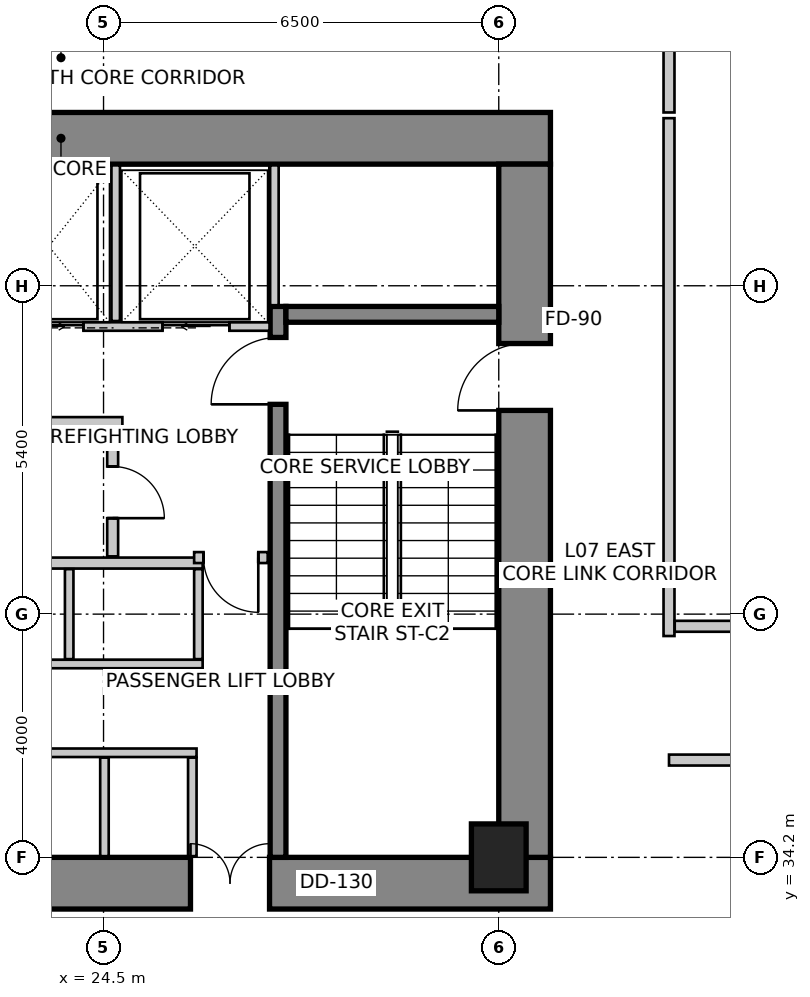
"""IFC4 building model, lengths in metres.
Left out: names, types, materials, properties, quantities, classifications, styles, units other than length and angle.
Written with IfcOpenShell. Run it as: python <this file> out.ifc"""

import sys

from ifc_helpers import new_model, si_unit, direction, frame, frame_2d, origin, origin_2d, place, context, subcontext, project, spatial, rectangle, extrude, source, transform, mapped, element, fill, save


model = new_model("IFC4")
c1 = context("Model", 3, precision=1e-05, world=origin(), true_north=direction((0.0, 1.0)))
c2 = subcontext(c1, "Body", "Model", "MODEL_VIEW")
j1 = project(units=[si_unit("LENGTHUNIT", "METRE"), si_unit("PLANEANGLEUNIT", "RADIAN")], contexts=[c1])
p1 = place(None, origin())
s1 = spatial("IfcSite", under=j1, at=p1, CompositionType="ELEMENT")
p2 = place(p1, origin())
s2 = spatial("IfcBuilding", under=s1, at=p2, CompositionType="ELEMENT")
p3 = place(p2, frame((0.0, 0.0, 31.0)))
s3 = spatial("IfcBuildingStorey", under=s2, at=p3, CompositionType="ELEMENT", Elevation=31.0)
p4 = place(p3, frame((15.75, 46.025, 0.0), z_axis=(0.0, 0.0, 1.0), x_axis=(1.0, 0.0, 0.0)))
e1 = element("IfcWall", 1, at=p4, inside=s3, PredefinedType="SHEAR", context=c2, shape_type="SweptSolid", body=[
    extrude(rectangle(XDim=16.1, YDim=0.85, at=frame_2d((8.05, 0.0))), origin(), (0.0, 0.0, 1.0), 4.0),
])
p5 = place(p3, frame((15.75, 33.775, 0.0), z_axis=(0.0, 0.0, 1.0), x_axis=(1.0, 0.0, 0.0)))
e2 = element("IfcWall", 2, at=p5, inside=s3, PredefinedType="SHEAR", context=c2, shape_type="SweptSolid", body=[
    extrude(rectangle(XDim=16.1, YDim=0.85, at=frame_2d((8.05, 0.0))), origin(), (0.0, 0.0, 1.0), 4.0),
])
m1 = source(origin(), c2, "Body", "SweptSolid", [
    extrude(rectangle(XDim=1.3, YDim=2.15, at=frame_2d((0.65, 1.075))), frame((0.0, 0.435, 0.0), z_axis=(0.0, -1.0, 0.0), x_axis=(1.0, 0.0, 0.0)), (0.0, 0.0, 1.0), 0.87),
])
p6 = place(p5, frame((10.18, 0.0, 0.0)))
e3 = element("IfcOpeningElement", 3, at=p6, cuts=e2, PredefinedType="OPENING", context=c2, shape_type="MappedRepresentation", body=[
    mapped(m1, transform((0.0, 0.0, 0.0), scale=1.0)),
])
p7 = place(p3, frame((31.425, 34.2, 0.0), z_axis=(0.0, 0.0, 1.0), x_axis=(0.0, 1.0, 0.0)))
e4 = element("IfcWall", 4, at=p7, inside=s3, PredefinedType="SHEAR", context=c2, shape_type="SweptSolid", body=[
    extrude(rectangle(XDim=11.4, YDim=0.85, at=frame_2d((5.7, 0.0))), origin(), (0.0, 0.0, 1.0), 4.0),
])
m2 = source(origin(), c2, "Body", "SweptSolid", [
    extrude(rectangle(XDim=1.1, YDim=2.15, at=frame_2d((0.55, 1.075))), frame((0.0, 0.435, 0.0), z_axis=(0.0, -1.0, 0.0), x_axis=(1.0, 0.0, 0.0)), (0.0, 0.0, 1.0), 0.87),
])
p8 = place(p7, frame((7.35, 0.0, 0.0)))
e5 = element("IfcOpeningElement", 5, at=p8, cuts=e4, PredefinedType="OPENING", context=c2, shape_type="MappedRepresentation", body=[
    mapped(m2, transform((0.0, 0.0, 0.0), scale=1.0)),
])
p9 = place(p3, frame((27.37, 34.2, 0.0), z_axis=(0.0, 0.0, 1.0), x_axis=(0.0, 1.0, 0.0)))
e6 = element("IfcWall", 6, at=p9, inside=s3, PredefinedType="SHEAR", context=c2, shape_type="SweptSolid", body=[
    extrude(rectangle(XDim=9.06, YDim=0.26, at=frame_2d((4.53, 0.0))), origin(), (0.0, 0.0, 1.0), 4.0),
])
m3 = source(origin(), c2, "Body", "SweptSolid", [
    extrude(rectangle(XDim=1.1, YDim=2.15, at=frame_2d((0.55, 1.075))), frame((0.0, 0.14, 0.0), z_axis=(0.0, -1.0, 0.0), x_axis=(1.0, 0.0, 0.0)), (0.0, 0.0, 1.0), 0.28),
])
p10 = place(p9, frame((7.45, 0.0, 0.0)))
e7 = element("IfcOpeningElement", 7, at=p10, cuts=e6, PredefinedType="OPENING", context=c2, shape_type="MappedRepresentation", body=[
    mapped(m3, transform((0.0, 0.0, 0.0), scale=1.0)),
])
p11 = place(p3, frame((27.5, 43.13, 0.0), z_axis=(0.0, 0.0, 1.0), x_axis=(1.0, 0.0, 0.0)))
e8 = element("IfcWall", 8, at=p11, inside=s3, PredefinedType="SHEAR", context=c2, shape_type="SweptSolid", body=[
    extrude(rectangle(XDim=3.5, YDim=0.26, at=frame_2d((1.75, 0.0))), origin(), (0.0, 0.0, 1.0), 4.0),
])
m4 = source(origin(), c2, "Body", "SweptSolid", [
    extrude(rectangle(XDim=0.9, YDim=1.1, at=origin_2d()), origin(), (0.0, 0.0, 1.0), 4.0),
])
p12 = place(p3, frame((31.0, 34.2, 0.0), z_axis=(0.0, 0.0, 1.0), x_axis=(1.0, 0.0, 0.0)))
e9 = element("IfcColumn", 9, at=p12, inside=s3, PredefinedType="COLUMN", context=c2, shape_type="MappedRepresentation", body=[
    mapped(m4, transform((0.0, 0.0, 0.0), scale=1.0)),
])
p13 = place(p3, frame((58.761, 46.648, 0.0), z_axis=(0.0, 0.0, 1.0), x_axis=(-0.98607502735, 0.166301053624, 0.0)))
e10 = element("IfcWall", 10, at=p13, inside=s3, PredefinedType="SOLIDWALL", context=c2, shape_type="SweptSolid", body=[
    extrude(rectangle(XDim=37.397, YDim=0.3, at=frame_2d((18.699, 0.0))), origin(), (0.0, 0.0, 1.0), 3.75),
])
m5 = source(origin(), c2, "Body", "SweptSolid", [
    extrude(rectangle(XDim=2.1, YDim=2.0, at=frame_2d((1.05, 1.0))), frame((0.0, 0.16, 0.0), z_axis=(0.0, -1.0, 0.0), x_axis=(1.0, 0.0, 0.0)), (0.0, 0.0, 1.0), 0.32),
])
p14 = place(p13, frame((0.525, 0.0, 0.85)))
e11 = element("IfcOpeningElement", 11, at=p14, cuts=e10, PredefinedType="OPENING", context=c2, shape_type="MappedRepresentation", body=[
    mapped(m5, transform((0.0, 0.0, 0.0), scale=1.0)),
])
m6 = source(origin(), c2, "Body", "SweptSolid", [
    extrude(rectangle(XDim=2.4, YDim=2.2, at=frame_2d((1.2, 1.1))), frame((0.0, 0.16, 0.0), z_axis=(0.0, -1.0, 0.0), x_axis=(1.0, 0.0, 0.0)), (0.0, 0.0, 1.0), 0.32),
])
p15 = place(p13, frame((4.74, 0.0, 0.85)))
e12 = element("IfcOpeningElement", 12, at=p15, cuts=e10, PredefinedType="OPENING", context=c2, shape_type="MappedRepresentation", body=[
    mapped(m6, transform((0.0, 0.0, 0.0), scale=1.0)),
])
m7 = source(origin(), c2, "Body", "SweptSolid", [
    extrude(rectangle(XDim=2.8, YDim=2.4, at=frame_2d((1.4, 1.2))), frame((0.0, 0.16, 0.0), z_axis=(0.0, -1.0, 0.0), x_axis=(1.0, 0.0, 0.0)), (0.0, 0.0, 1.0), 0.32),
])
p16 = place(p13, frame((9.881, 0.0, 0.85)))
e13 = element("IfcOpeningElement", 13, at=p16, cuts=e10, PredefinedType="OPENING", context=c2, shape_type="MappedRepresentation", body=[
    mapped(m7, transform((0.0, 0.0, 0.0), scale=1.0)),
])
p17 = place(p13, frame((15.473, 0.0, 0.85)))
e14 = element("IfcOpeningElement", 14, at=p17, cuts=e10, PredefinedType="OPENING", context=c2, shape_type="MappedRepresentation", body=[
    mapped(m6, transform((0.0, 0.0, 0.0), scale=1.0)),
])
p18 = place(p13, frame((19.836, 0.0, 0.85)))
e15 = element("IfcOpeningElement", 15, at=p18, cuts=e10, PredefinedType="OPENING", context=c2, shape_type="MappedRepresentation", body=[
    mapped(m7, transform((0.0, 0.0, 0.0), scale=1.0)),
])
p19 = place(p13, frame((24.598, 0.0, 0.85)))
e16 = element("IfcOpeningElement", 16, at=p19, cuts=e10, PredefinedType="OPENING", context=c2, shape_type="MappedRepresentation", body=[
    mapped(m6, transform((0.0, 0.0, 0.0), scale=1.0)),
])
p20 = place(p13, frame((29.957, 0.0, 0.85)))
e17 = element("IfcOpeningElement", 17, at=p20, cuts=e10, PredefinedType="OPENING", context=c2, shape_type="MappedRepresentation", body=[
    mapped(m6, transform((0.0, 0.0, 0.0), scale=1.0)),
])
p21 = place(p13, frame((34.456, 0.0, 0.85)))
e18 = element("IfcOpeningElement", 18, at=p21, cuts=e10, PredefinedType="OPENING", context=c2, shape_type="MappedRepresentation", body=[
    mapped(m6, transform((0.0, 0.0, 0.0), scale=1.0)),
])
p22 = place(p3, frame((20.37, 42.93, 0.0), z_axis=(0.0, 0.0, 1.0), x_axis=(1.0, 0.0, 0.0)))
e19 = element("IfcWall", 19, at=p22, inside=s3, PredefinedType="SOLIDWALL", context=c2, shape_type="SweptSolid", body=[
    extrude(rectangle(XDim=6.86, YDim=0.14, at=frame_2d((3.43, 0.0))), origin(), (0.0, 0.0, 1.0), 3.75),
])
m8 = source(origin(), c2, "Body", "SweptSolid", [
    extrude(rectangle(XDim=1.1, YDim=2.15, at=frame_2d((0.55, 1.075))), frame((0.0, 0.08, 0.0), z_axis=(0.0, -1.0, 0.0), x_axis=(1.0, 0.0, 0.0)), (0.0, 0.0, 1.0), 0.16),
])
p23 = place(p22, frame((0.5, 0.0, 0.0)))
e20 = element("IfcOpeningElement", 20, at=p23, cuts=e19, PredefinedType="OPENING", context=c2, shape_type="MappedRepresentation", body=[
    mapped(m8, transform((0.0, 0.0, 0.0), scale=1.0)),
])
p24 = place(p22, frame((2.7, 0.0, 0.0)))
e21 = element("IfcOpeningElement", 21, at=p24, cuts=e19, PredefinedType="OPENING", context=c2, shape_type="MappedRepresentation", body=[
    mapped(m8, transform((0.0, 0.0, 0.0), scale=1.0)),
])
p25 = place(p22, frame((5.1, 0.0, 0.0)))
e22 = element("IfcOpeningElement", 22, at=p25, cuts=e19, PredefinedType="OPENING", context=c2, shape_type="MappedRepresentation", body=[
    mapped(m8, transform((0.0, 0.0, 0.0), scale=1.0)),
])
p26 = place(p3, frame((27.31, 43.28, 0.0), z_axis=(0.0, 0.0, 1.0), x_axis=(0.0, 1.0, 0.0)))
e23 = element("IfcWall", 23, at=p26, inside=s3, PredefinedType="SOLIDWALL", context=c2, shape_type="SweptSolid", body=[
    extrude(rectangle(XDim=2.3, YDim=0.14, at=frame_2d((1.15, 0.0))), origin(), (0.0, 0.0, 1.0), 3.75),
])
p27 = place(p3, frame((24.7, 43.02, 0.0), z_axis=(0.0, 0.0, 1.0), x_axis=(0.0, 1.0, 0.0)))
e24 = element("IfcWall", 24, at=p27, inside=s3, PredefinedType="SOLIDWALL", context=c2, shape_type="SweptSolid", body=[
    extrude(rectangle(XDim=2.56, YDim=0.14, at=frame_2d((1.28, 0.0))), origin(), (0.0, 0.0, 1.0), 3.75),
])
p28 = place(p3, frame((20.38, 35.92, 0.0), z_axis=(0.0, 0.0, 1.0), x_axis=(1.0, 0.0, 0.0)))
e25 = element("IfcWall", 25, at=p28, inside=s3, PredefinedType="SOLIDWALL", context=c2, shape_type="SweptSolid", body=[
    extrude(rectangle(XDim=5.65, YDim=0.14, at=frame_2d((2.825, 0.0))), origin(), (0.0, 0.0, 1.0), 3.75),
])
m9 = source(origin(), c2, "Body", "SweptSolid", [
    extrude(rectangle(XDim=1.0, YDim=2.15, at=frame_2d((0.5, 1.075))), frame((0.0, 0.08, 0.0), z_axis=(0.0, -1.0, 0.0), x_axis=(1.0, 0.0, 0.0)), (0.0, 0.0, 1.0), 0.16),
])
p29 = place(p28, frame((0.16, 0.0, 0.0)))
e26 = element("IfcOpeningElement", 26, at=p29, cuts=e25, PredefinedType="OPENING", context=c2, shape_type="MappedRepresentation", body=[
    mapped(m9, transform((0.0, 0.0, 0.0), scale=1.0)),
])
p30 = place(p28, frame((1.55, 0.0, 0.0)))
e27 = element("IfcOpeningElement", 27, at=p30, cuts=e25, PredefinedType="OPENING", context=c2, shape_type="MappedRepresentation", body=[
    mapped(m9, transform((0.0, 0.0, 0.0), scale=1.0)),
])
for number, where, z_axis, x_axis in (
    (28, (25.96, 34.22, 0.0), (0.0, 0.0, 1.0), (0.0, 1.0, 0.0)),
    (29, (24.515, 34.22, 0.0), (0.0, 0.0, 1.0), (0.0, 1.0, 0.0)),
):
    element("IfcWall", number, at=place(p3, frame(where, z_axis=z_axis, x_axis=x_axis)), inside=s3, PredefinedType="SOLIDWALL", context=c2, shape_type="SweptSolid", body=[
        extrude(rectangle(XDim=1.62, YDim=0.14, at=frame_2d((0.81, 0.0))), origin(), (0.0, 0.0, 1.0), 3.042),
    ])
p31 = place(p3, frame((20.38, 37.38, 0.0), z_axis=(0.0, 0.0, 1.0), x_axis=(1.0, 0.0, 0.0)))
e30 = element("IfcWall", 30, at=p31, inside=s3, PredefinedType="SOLIDWALL", context=c2, shape_type="SweptSolid", body=[
    extrude(rectangle(XDim=5.75, YDim=0.14, at=frame_2d((2.875, 0.0))), origin(), (0.0, 0.0, 1.0), 3.75),
])
p32 = place(p3, frame((20.38, 39.04, 0.0), z_axis=(0.0, 0.0, 1.0), x_axis=(1.0, 0.0, 0.0)))
e31 = element("IfcWall", 31, at=p32, inside=s3, PredefinedType="SOLIDWALL", context=c2, shape_type="SweptSolid", body=[
    extrude(rectangle(XDim=5.75, YDim=0.18, at=frame_2d((2.875, 0.0))), origin(), (0.0, 0.0, 1.0), 3.75),
])
for number, where, z_axis, x_axis in (
    (32, (26.06, 37.46, 0.0), (0.0, 0.0, 1.0), (0.0, 1.0, 0.0)),
    (33, (23.935, 37.46, 0.0), (0.0, 0.0, 1.0), (0.0, 1.0, 0.0)),
):
    element("IfcWall", number, at=place(p3, frame(where, z_axis=z_axis, x_axis=x_axis)), inside=s3, PredefinedType="SOLIDWALL", context=c2, shape_type="SweptSolid", body=[
        extrude(rectangle(XDim=1.48, YDim=0.14, at=frame_2d((0.74, 0.0))), origin(), (0.0, 0.0, 1.0), 3.75),
    ])
p33 = place(p3, frame((24.81, 41.35, 0.0), z_axis=(0.0, 0.0, 1.0), x_axis=(-1.0, 0.0, 0.0)))
e34 = element("IfcWall", 34, at=p33, inside=s3, PredefinedType="PARTITIONING", context=c2, shape_type="SweptSolid", body=[
    extrude(rectangle(XDim=4.43, YDim=0.18, at=frame_2d((2.215, 0.0))), origin(), (0.0, 0.0, 1.0), 3.75),
])
p34 = place(p3, frame((24.65, 41.256, 0.0), z_axis=(0.0, 0.0, 1.0), x_axis=(0.0, -1.0, 0.0)))
e35 = element("IfcWall", 35, at=p34, inside=s3, PredefinedType="PARTITIONING", context=c2, shape_type="SweptSolid", body=[
    extrude(rectangle(XDim=2.106, YDim=0.18, at=frame_2d((1.053, 0.0))), origin(), (0.0, 0.0, 1.0), 3.75),
])
m10 = source(origin(), c2, "Body", "SweptSolid", [
    extrude(rectangle(XDim=0.85, YDim=2.15, at=frame_2d((0.425, 1.075))), frame((0.0, 0.1, 0.0), z_axis=(0.0, -1.0, 0.0), x_axis=(1.0, 0.0, 0.0)), (0.0, 0.0, 1.0), 0.2),
])
p35 = place(p34, frame((0.628, 0.0, 0.0)))
e36 = element("IfcOpeningElement", 36, at=p35, cuts=e35, PredefinedType="OPENING", context=c2, shape_type="MappedRepresentation", body=[
    mapped(m10, transform((0.0, 0.0, 0.0), scale=1.0)),
])
p36 = place(p3, frame((27.2, 39.13, 0.0), z_axis=(0.0, 0.0, 1.0), x_axis=(-1.0, 0.0, 0.0)))
e37 = element("IfcWall", 37, at=p36, inside=s3, PredefinedType="PARTITIONING", context=c2, shape_type="SweptSolid", body=[
    extrude(rectangle(XDim=1.21, YDim=0.18, at=frame_2d((0.605, 0.0))), origin(), (0.0, 0.0, 1.0), 3.75),
])
m11 = source(origin(), c2, "Body", "SweptSolid", [
    extrude(rectangle(XDim=0.9, YDim=2.15, at=frame_2d((0.45, 1.075))), frame((0.0, 0.1, 0.0), z_axis=(0.0, -1.0, 0.0), x_axis=(1.0, 0.0, 0.0)), (0.0, 0.0, 1.0), 0.2),
])
p37 = place(p36, frame((0.155, 0.0, 0.0)))
e38 = element("IfcOpeningElement", 38, at=p37, cuts=e37, PredefinedType="OPENING", context=c2, shape_type="MappedRepresentation", body=[
    mapped(m11, transform((0.0, 0.0, 0.0), scale=1.0)),
])
p38 = place(p3, frame((33.8, 48.6, 0.0), z_axis=(0.0, 0.0, 1.0), x_axis=(0.0, -1.0, 0.0)))
e39 = element("IfcWall", 39, at=p38, inside=s3, PredefinedType="PARTITIONING", context=c2, shape_type="SweptSolid", body=[
    extrude(rectangle(XDim=2.15, YDim=0.18, at=frame_2d((1.075, 0.0))), origin(), (0.0, 0.0, 1.0), 2.892),
])
p39 = place(p3, frame((33.8, 46.356, 0.0), z_axis=(0.0, 0.0, 1.0), x_axis=(0.0, -1.0, 0.0)))
e40 = element("IfcWall", 40, at=p39, inside=s3, PredefinedType="PARTITIONING", context=c2, shape_type="SweptSolid", body=[
    extrude(rectangle(XDim=8.516, YDim=0.18, at=frame_2d((4.258, 0.0))), origin(), (0.0, 0.0, 1.0), 3.279),
])
p40 = place(p3, frame((33.894, 38.0, 0.0), z_axis=(0.0, 0.0, 1.0), x_axis=(1.0, 0.0, 0.0)))
e41 = element("IfcWall", 41, at=p40, inside=s3, PredefinedType="PARTITIONING", context=c2, shape_type="SweptSolid", body=[
    extrude(rectangle(XDim=11.033, YDim=0.18, at=frame_2d((5.517, 0.0))), origin(), (0.0, 0.0, 1.0), 3.125),
])
p41 = place(p40, frame((5.006, 0.0, 0.0)))
e42 = element("IfcOpeningElement", 42, at=p41, cuts=e41, PredefinedType="OPENING", context=c2, shape_type="MappedRepresentation", body=[
    mapped(m11, transform((0.0, 0.0, 0.0), scale=1.0)),
])
p42 = place(p3, frame((55.641, 35.8, 0.0), z_axis=(0.0, 0.0, 1.0), x_axis=(-1.0, 0.0, 0.0)))
e43 = element("IfcWall", 43, at=p42, inside=s3, PredefinedType="PARTITIONING", context=c2, shape_type="SweptSolid", body=[
    extrude(rectangle(XDim=21.841, YDim=0.18, at=frame_2d((10.92, 0.0))), origin(), (0.0, 0.0, 1.0), 3.125),
])
p43 = place(p42, frame((10.531, 0.0, 0.0)))
e44 = element("IfcOpeningElement", 44, at=p43, cuts=e43, PredefinedType="OPENING", context=c2, shape_type="MappedRepresentation", body=[
    mapped(m11, transform((0.0, 0.0, 0.0), scale=1.0)),
])
m12 = source(origin(), c2, "Body", "SweptSolid", [
    extrude(rectangle(XDim=1.1, YDim=2.15, at=frame_2d((0.55, 1.075))), frame((0.0, 0.025, 0.0), z_axis=(0.0, -1.0, 0.0), x_axis=(1.0, 0.0, 0.0)), (0.0, 0.0, 1.0), 0.05),
])
p44 = place(p24, origin())
e45 = element("IfcDoor", 45, at=p44, inside=s3, OperationType="SLIDING_TO_RIGHT", PredefinedType="DOOR", context=c2, shape_type="MappedRepresentation", body=[
    mapped(m12, transform((0.0, 0.0, 0.0), scale=1.0)),
])
fill(e21, e45)
m13 = source(origin(), c2, "Body", "SweptSolid", [
    extrude(rectangle(XDim=1.1, YDim=2.15, at=frame_2d((0.55, 1.075))), frame((0.0, 0.025, 0.0), z_axis=(0.0, -1.0, 0.0), x_axis=(1.0, 0.0, 0.0)), (0.0, 0.0, 1.0), 0.05),
])
p45 = place(p25, origin())
e46 = element("IfcDoor", 46, at=p45, inside=s3, OperationType="SLIDING_TO_LEFT", PredefinedType="DOOR", context=c2, shape_type="MappedRepresentation", body=[
    mapped(m13, transform((0.0, 0.0, 0.0), scale=1.0)),
])
fill(e22, e46)
m14 = source(origin(), c2, "Body", "SweptSolid", [
    extrude(rectangle(XDim=1.1, YDim=2.15, at=frame_2d((0.55, 1.075))), frame((0.0, 0.025, 0.0), z_axis=(0.0, -1.0, 0.0), x_axis=(1.0, 0.0, 0.0)), (0.0, 0.0, 1.0), 0.05),
])
p46 = place(p10, origin())
e47 = element("IfcDoor", 47, at=p46, inside=s3, OperationType="SINGLE_SWING_LEFT", PredefinedType="DOOR", context=c2, shape_type="MappedRepresentation", body=[
    mapped(m14, transform((0.0, 0.0, 0.0), scale=1.0)),
])
fill(e7, e47)
p47 = place(p8, origin())
e48 = element("IfcDoor", 48, at=p47, inside=s3, OperationType="SINGLE_SWING_LEFT", PredefinedType="DOOR", context=c2, shape_type="MappedRepresentation", body=[
    mapped(m14, transform((0.0, 0.0, 0.0), scale=1.0)),
])
fill(e5, e48)
m15 = source(origin(), c2, "Body", "SweptSolid", [
    extrude(rectangle(XDim=1.3, YDim=2.15, at=frame_2d((0.65, 1.075))), frame((0.0, 0.025, 0.0), z_axis=(0.0, -1.0, 0.0), x_axis=(1.0, 0.0, 0.0)), (0.0, 0.0, 1.0), 0.05),
])
p48 = place(p6, origin())
e49 = element("IfcDoor", 49, at=p48, inside=s3, OperationType="DOUBLE_DOOR_SINGLE_SWING", PredefinedType="DOOR", context=c2, shape_type="MappedRepresentation", body=[
    mapped(m15, transform((0.0, 0.0, 0.0), scale=1.0)),
])
fill(e3, e49)
m16 = source(origin(), c2, "Body", "SweptSolid", [
    extrude(rectangle(XDim=0.85, YDim=2.15, at=frame_2d((0.425, 1.075))), frame((0.0, 0.025, 0.0), z_axis=(0.0, -1.0, 0.0), x_axis=(1.0, 0.0, 0.0)), (0.0, 0.0, 1.0), 0.05),
])
p49 = place(p35, origin())
e50 = element("IfcDoor", 50, at=p49, inside=s3, OperationType="SINGLE_SWING_RIGHT", PredefinedType="DOOR", context=c2, shape_type="MappedRepresentation", body=[
    mapped(m16, transform((0.0, 0.0, 0.0), scale=1.0)),
])
fill(e36, e50)
m17 = source(origin(), c2, "Body", "SweptSolid", [
    extrude(rectangle(XDim=0.9, YDim=2.15, at=frame_2d((0.45, 1.075))), frame((0.0, 0.025, 0.0), z_axis=(0.0, -1.0, 0.0), x_axis=(1.0, 0.0, 0.0)), (0.0, 0.0, 1.0), 0.05),
])
p50 = place(p37, origin())
e51 = element("IfcDoor", 51, at=p50, inside=s3, OperationType="SINGLE_SWING_LEFT", PredefinedType="DOOR", context=c2, shape_type="MappedRepresentation", body=[
    mapped(m17, transform((0.0, 0.0, 0.0), scale=1.0)),
])
fill(e38, e51)
save(model, sys.argv[1])
